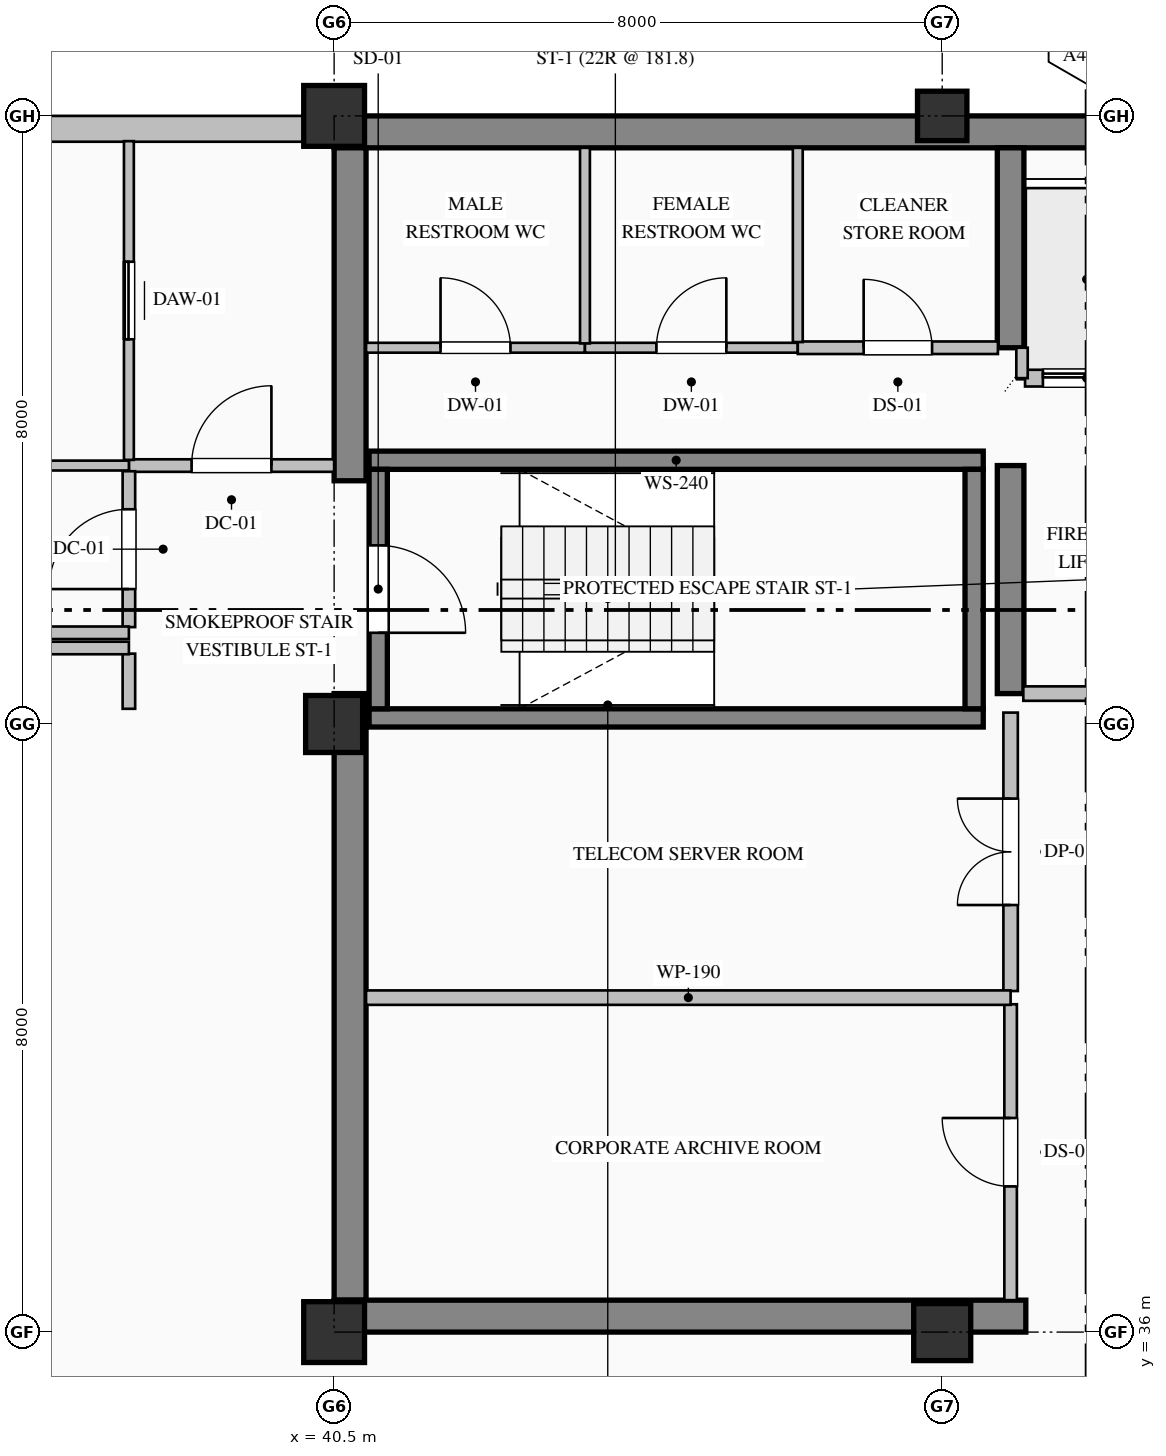
"""IFC4 building model, lengths in metres.
Left out: names, types, materials, properties, quantities, classifications, styles, units other than length and angle.
Written with IfcOpenShell. Run it as: python <this file> out.ifc"""

import sys

from ifc_helpers import new_model, si_unit, direction, frame, frame_2d, origin, origin_2d, place, context, subcontext, project, spatial, rectangle, hollow_rectangle, extrude, element, fill, save


model = new_model("IFC4")
c1 = context("Model", 3, precision=1e-05, world=origin(), true_north=direction((0.0, 1.0)))
c2 = subcontext(c1, "Body", "Model", "MODEL_VIEW")
j1 = project(units=[si_unit("LENGTHUNIT", "METRE"), si_unit("PLANEANGLEUNIT", "RADIAN")], contexts=[c1])
p1 = place(None, origin())
s1 = spatial("IfcSite", under=j1, at=p1, CompositionType="ELEMENT")
p2 = place(p1, origin())
s2 = spatial("IfcBuilding", under=s1, at=p2, CompositionType="ELEMENT")
p3 = place(p2, frame((0.0, 0.0, 335.2)))
s3 = spatial("IfcBuildingStorey", under=s2, at=p3, CompositionType="ELEMENT", Elevation=335.2)
p4 = place(p3, frame((40.5, 51.79, 0.0), z_axis=(0.0, 0.0, 1.0), x_axis=(1.0, 0.0, 0.0)))
e1 = element("IfcWall", 1, at=p4, inside=s3, PredefinedType="SHEAR", context=c2, shape_type="SweptSolid", body=[
    extrude(rectangle(XDim=23.5, YDim=0.42, at=frame_2d((11.75, 0.0))), origin(), (0.0, 0.0, 1.0), 3.785),
])
p5 = place(p3, frame((40.71, 36.42, 0.0), z_axis=(0.0, 0.0, 1.0), x_axis=(0.0, 1.0, 0.0)))
e2 = element("IfcWall", 2, at=p5, inside=s3, PredefinedType="SHEAR", context=c2, shape_type="SweptSolid", body=[
    extrude(rectangle(XDim=7.98, YDim=0.42, at=frame_2d((3.99, 0.0))), origin(), (0.0, 0.0, 1.0), 3.785),
])
p6 = place(p3, frame((40.71, 47.2, 0.0), z_axis=(0.0, 0.0, 1.0), x_axis=(0.0, 1.0, 0.0)))
e3 = element("IfcWall", 3, at=p6, inside=s3, PredefinedType="SHEAR", context=c2, shape_type="SweptSolid", body=[
    extrude(rectangle(XDim=4.38, YDim=0.42, at=frame_2d((2.19, 0.0))), origin(), (0.0, 0.0, 1.0), 3.785),
])
p7 = place(p3, frame((40.5, 36.21, 0.0), z_axis=(0.0, 0.0, 1.0), x_axis=(1.0, 0.0, 0.0)))
e4 = element("IfcWall", 4, at=p7, inside=s3, PredefinedType="SHEAR", context=c2, shape_type="SweptSolid", body=[
    extrude(rectangle(XDim=9.1, YDim=0.42, at=frame_2d((4.55, 0.0))), origin(), (0.0, 0.0, 1.0), 3.785),
])
p8 = place(p3, frame((49.4, 44.4, 0.0), z_axis=(0.0, 0.0, 1.0), x_axis=(0.0, 1.0, 0.0)))
e5 = element("IfcWall", 5, at=p8, inside=s3, PredefinedType="SHEAR", context=c2, shape_type="SweptSolid", body=[
    extrude(rectangle(XDim=3.0, YDim=0.35, at=frame_2d((1.5, 0.0))), origin(), (0.0, 0.0, 1.0), 3.785),
])
p9 = place(p3, frame((49.4, 48.95, 0.0), z_axis=(0.0, 0.0, 1.0), x_axis=(0.0, 1.0, 0.0)))
e6 = element("IfcWall", 6, at=p9, inside=s3, PredefinedType="SHEAR", context=c2, shape_type="SweptSolid", body=[
    extrude(rectangle(XDim=2.63, YDim=0.35, at=frame_2d((1.315, 0.0))), origin(), (0.0, 0.0, 1.0), 3.785),
])
p10 = place(p3, frame((40.5, 36.0, 0.0), z_axis=(0.0, 0.0, 1.0), x_axis=(1.0, 0.0, 0.0)))
e7 = element("IfcColumn", 7, at=p10, inside=s3, PredefinedType="COLUMN", context=c2, shape_type="SweptSolid", body=[
    extrude(hollow_rectangle(XDim=0.8, YDim=0.8, WallThickness=0.032, at=origin_2d()), origin(), (0.0, 0.0, 1.0), 4.0),
])
p11 = place(p3, frame((40.5, 44.0, 0.0), z_axis=(0.0, 0.0, 1.0), x_axis=(1.0, 0.0, 0.0)))
e8 = element("IfcColumn", 8, at=p11, inside=s3, PredefinedType="COLUMN", context=c2, shape_type="SweptSolid", body=[
    extrude(rectangle(XDim=0.75, YDim=0.75, at=origin_2d()), origin(), (0.0, 0.0, 1.0), 4.0),
])
p12 = place(p3, frame((40.5, 52.0, 0.0), z_axis=(0.0, 0.0, 1.0), x_axis=(1.0, 0.0, 0.0)))
e9 = element("IfcColumn", 9, at=p12, inside=s3, PredefinedType="COLUMN", context=c2, shape_type="SweptSolid", body=[
    extrude(hollow_rectangle(XDim=0.8, YDim=0.8, WallThickness=0.032, at=origin_2d()), origin(), (0.0, 0.0, 1.0), 4.0),
])
p13 = place(p3, frame((48.5, 36.0, 0.0), z_axis=(0.0, 0.0, 1.0), x_axis=(1.0, 0.0, 0.0)))
e10 = element("IfcColumn", 10, at=p13, inside=s3, PredefinedType="COLUMN", context=c2, shape_type="SweptSolid", body=[
    extrude(rectangle(XDim=0.75, YDim=0.75, at=origin_2d()), origin(), (0.0, 0.0, 1.0), 4.0),
])
p14 = place(p3, frame((48.5, 52.0, 0.0), z_axis=(0.0, 0.0, 1.0), x_axis=(1.0, 0.0, 0.0)))
e11 = element("IfcColumn", 11, at=p14, inside=s3, PredefinedType="COLUMN", context=c2, shape_type="SweptSolid", body=[
    extrude(hollow_rectangle(XDim=0.65, YDim=0.65, WallThickness=0.028, at=origin_2d()), origin(), (0.0, 0.0, 1.0), 4.0),
])
p15 = place(p3, frame((20.5, 51.83, 0.0), z_axis=(0.0, 0.0, 1.0), x_axis=(1.0, 0.0, 0.0)))
e12 = element("IfcWall", 12, at=p15, inside=s3, PredefinedType="SOLIDWALL", context=c2, shape_type="SweptSolid", body=[
    extrude(rectangle(XDim=20.02, YDim=0.34, at=frame_2d((10.01, 0.0))), origin(), (0.0, 0.0, 1.0), 3.335),
])
p16 = place(p15, frame((6.725, 0.0, 0.9)))
e13 = element("IfcOpeningElement", 13, at=p16, cuts=e12, PredefinedType="OPENING", context=c2, shape_type="SweptSolid", body=[
    extrude(rectangle(XDim=0.95, YDim=1.85, at=frame_2d((0.475, 0.925))), frame((0.0, 0.18, 0.0), z_axis=(0.0, -1.0, 0.0), x_axis=(1.0, 0.0, 0.0)), (0.0, 0.0, 1.0), 0.36),
])
p17 = place(p15, frame((10.275, 0.0, 0.8)))
e14 = element("IfcOpeningElement", 14, at=p17, cuts=e12, PredefinedType="OPENING", context=c2, shape_type="SweptSolid", body=[
    extrude(rectangle(XDim=1.05, YDim=2.15, at=frame_2d((0.525, 1.075))), frame((0.0, 0.18, 0.0), z_axis=(0.0, -1.0, 0.0), x_axis=(1.0, 0.0, 0.0)), (0.0, 0.0, 1.0), 0.36),
])
for number, where, z_axis, x_axis in (
    (15, (40.96, 47.47, 0.0), (0.0, 0.0, 1.0), (1.0, 0.0, 0.0)),
    (16, (49.04, 44.08, 0.0), (0.0, 0.0, 1.0), (-1.0, 0.0, 0.0)),
):
    element("IfcWall", number, at=place(p3, frame(where, z_axis=z_axis, x_axis=x_axis)), inside=s3, PredefinedType="SOLIDWALL", context=c2, shape_type="SweptSolid", body=[
        extrude(rectangle(XDim=8.08, YDim=0.24, at=frame_2d((4.04, 0.0))), origin(), (0.0, 0.0, 1.0), 4.0),
    ])
p18 = place(p3, frame((41.08, 47.35, 0.0), z_axis=(0.0, 0.0, 1.0), x_axis=(0.0, -1.0, 0.0)))
e17 = element("IfcWall", 17, at=p18, inside=s3, PredefinedType="SOLIDWALL", context=c2, shape_type="SweptSolid", body=[
    extrude(rectangle(XDim=3.15, YDim=0.24, at=frame_2d((1.575, 0.0))), origin(), (0.0, 0.0, 1.0), 4.0),
])
p19 = place(p18, frame((1.0, 0.0, 0.0)))
e18 = element("IfcOpeningElement", 18, at=p19, cuts=e17, PredefinedType="OPENING", context=c2, shape_type="SweptSolid", body=[
    extrude(rectangle(XDim=1.15, YDim=2.2, at=frame_2d((0.575, 1.1))), frame((0.0, 0.13, 0.0), z_axis=(0.0, -1.0, 0.0), x_axis=(1.0, 0.0, 0.0)), (0.0, 0.0, 1.0), 0.26),
])
p20 = place(p3, frame((48.92, 44.2, 0.0), z_axis=(0.0, 0.0, 1.0), x_axis=(0.0, 1.0, 0.0)))
e19 = element("IfcWall", 19, at=p20, inside=s3, PredefinedType="SOLIDWALL", context=c2, shape_type="SweptSolid", body=[
    extrude(rectangle(XDim=3.15, YDim=0.24, at=frame_2d((1.575, 0.0))), origin(), (0.0, 0.0, 1.0), 4.0),
])
p21 = place(p3, frame((54.71, 48.55, 0.0), z_axis=(0.0, 0.0, 1.0), x_axis=(-1.0, 0.0, 0.0)))
e20 = element("IfcWall", 20, at=p21, inside=s3, PredefinedType="PARTITIONING", context=c2, shape_type="SweptSolid", body=[
    extrude(rectangle(XDim=5.12, YDim=0.22, at=frame_2d((2.56, 0.0))), origin(), (0.0, 0.0, 1.0), 3.785),
])
p22 = place(p21, frame((3.735, 0.0, 0.0)))
e21 = element("IfcOpeningElement", 21, at=p22, cuts=e20, PredefinedType="OPENING", context=c2, shape_type="SweptSolid", body=[
    extrude(rectangle(XDim=1.15, YDim=2.2, at=frame_2d((0.575, 1.1))), frame((0.0, 0.12, 0.0), z_axis=(0.0, -1.0, 0.0), x_axis=(1.0, 0.0, 0.0)), (0.0, 0.0, 1.0), 0.24),
])
p23 = place(p21, frame((0.935, 0.0, 0.0)))
e22 = element("IfcOpeningElement", 22, at=p23, cuts=e20, PredefinedType="OPENING", context=c2, shape_type="SweptSolid", body=[
    extrude(rectangle(XDim=1.15, YDim=2.2, at=frame_2d((0.575, 1.1))), frame((0.0, 0.12, 0.0), z_axis=(0.0, -1.0, 0.0), x_axis=(1.0, 0.0, 0.0)), (0.0, 0.0, 1.0), 0.24),
])
p24 = place(p3, frame((49.55, 48.55, 0.0), z_axis=(0.0, 0.0, 1.0), x_axis=(0.0, 1.0, 0.0)))
e23 = element("IfcWall", 23, at=p24, inside=s3, PredefinedType="PARTITIONING", context=c2, shape_type="SweptSolid", body=[
    extrude(rectangle(XDim=0.4, YDim=0.15, at=frame_2d((0.2, 0.0))), origin(), (0.0, 0.0, 1.0), 3.785),
])
p25 = place(p3, frame((37.8, 47.4, 0.0), z_axis=(0.0, 0.0, 1.0), x_axis=(1.0, 0.0, 0.0)))
e24 = element("IfcWall", 24, at=p25, inside=s3, PredefinedType="PARTITIONING", context=c2, shape_type="SweptSolid", body=[
    extrude(rectangle(XDim=2.7, YDim=0.165, at=frame_2d((1.35, 0.0))), origin(), (0.0, 0.0, 1.0), 3.785),
])
p26 = place(p25, frame((0.825, 0.0, 0.0)))
e25 = element("IfcOpeningElement", 25, at=p26, cuts=e24, PredefinedType="OPENING", context=c2, shape_type="SweptSolid", body=[
    extrude(rectangle(XDim=1.05, YDim=2.15, at=frame_2d((0.525, 1.075))), frame((0.0, 0.093, 0.0), z_axis=(0.0, -1.0, 0.0), x_axis=(1.0, 0.0, 0.0)), (0.0, 0.0, 1.0), 0.185),
])
p27 = place(p3, frame((37.8, 45.274, 0.0), z_axis=(0.0, 0.0, 1.0), x_axis=(0.0, 1.0, 0.0)))
e26 = element("IfcWall", 26, at=p27, inside=s3, PredefinedType="PARTITIONING", context=c2, shape_type="SweptSolid", body=[
    extrude(rectangle(XDim=2.051, YDim=0.165, at=frame_2d((1.025, 0.0))), origin(), (0.0, 0.0, 1.0), 3.785),
])
p28 = place(p27, frame((0.5, 0.0, 0.0)))
e27 = element("IfcOpeningElement", 27, at=p28, cuts=e26, PredefinedType="OPENING", context=c2, shape_type="SweptSolid", body=[
    extrude(rectangle(XDim=1.05, YDim=2.15, at=frame_2d((0.525, 1.075))), frame((0.0, 0.093, 0.0), z_axis=(0.0, -1.0, 0.0), x_axis=(1.0, 0.0, 0.0)), (0.0, 0.0, 1.0), 0.185),
])
p29 = place(p3, frame((37.8, 44.2, 0.0), z_axis=(0.0, 0.0, 1.0), x_axis=(0.0, 1.0, 0.0)))
e28 = element("IfcWall", 28, at=p29, inside=s3, PredefinedType="PARTITIONING", context=c2, shape_type="SweptSolid", body=[
    extrude(rectangle(XDim=0.726, YDim=0.165, at=frame_2d((0.363, 0.0))), origin(), (0.0, 0.0, 1.0), 3.785),
])
p30 = place(p3, frame((37.8, 47.475, 0.0), z_axis=(0.0, 0.0, 1.0), x_axis=(0.0, 1.0, 0.0)))
e29 = element("IfcWall", 29, at=p30, inside=s3, PredefinedType="PARTITIONING", context=c2, shape_type="SweptSolid", body=[
    extrude(rectangle(XDim=4.193, YDim=0.13, at=frame_2d((2.097, 0.0))), origin(), (0.0, 0.0, 1.0), 3.785),
])
p31 = place(p30, frame((1.587, 0.0, 0.0)))
e30 = element("IfcOpeningElement", 30, at=p31, cuts=e29, PredefinedType="OPENING", context=c2, shape_type="SweptSolid", body=[
    extrude(rectangle(XDim=1.02, YDim=2.15, at=frame_2d((0.51, 1.075))), frame((0.0, 0.075, 0.0), z_axis=(0.0, -1.0, 0.0), x_axis=(1.0, 0.0, 0.0)), (0.0, 0.0, 1.0), 0.15),
])
p32 = place(p3, frame((37.8, 47.4, 0.0), z_axis=(0.0, 0.0, 1.0), x_axis=(-1.0, 0.0, 0.0)))
e31 = element("IfcWall", 31, at=p32, inside=s3, PredefinedType="PARTITIONING", context=c2, shape_type="SweptSolid", body=[
    extrude(rectangle(XDim=2.4, YDim=0.13, at=frame_2d((1.2, 0.0))), origin(), (0.0, 0.0, 1.0), 3.785),
])
p33 = place(p3, frame((40.92, 48.95, 0.0), z_axis=(0.0, 0.0, 1.0), x_axis=(1.0, 0.0, 0.0)))
e32 = element("IfcWall", 32, at=p33, inside=s3, PredefinedType="PARTITIONING", context=c2, shape_type="SweptSolid", body=[
    extrude(rectangle(XDim=2.88, YDim=0.13, at=frame_2d((1.44, 0.0))), origin(), (0.0, 0.0, 1.0), 3.785),
])
p34 = place(p33, frame((0.98, 0.0, 0.0)))
e33 = element("IfcOpeningElement", 33, at=p34, cuts=e32, PredefinedType="OPENING", context=c2, shape_type="SweptSolid", body=[
    extrude(rectangle(XDim=0.92, YDim=2.15, at=frame_2d((0.46, 1.075))), frame((0.0, 0.075, 0.0), z_axis=(0.0, -1.0, 0.0), x_axis=(1.0, 0.0, 0.0)), (0.0, 0.0, 1.0), 0.15),
])
p35 = place(p3, frame((43.8, 48.95, 0.0), z_axis=(0.0, 0.0, 1.0), x_axis=(1.0, 0.0, 0.0)))
e34 = element("IfcWall", 34, at=p35, inside=s3, PredefinedType="PARTITIONING", context=c2, shape_type="SweptSolid", body=[
    extrude(rectangle(XDim=2.8, YDim=0.13, at=frame_2d((1.4, 0.0))), origin(), (0.0, 0.0, 1.0), 3.785),
])
p36 = place(p35, frame((0.94, 0.0, 0.0)))
e35 = element("IfcOpeningElement", 35, at=p36, cuts=e34, PredefinedType="OPENING", context=c2, shape_type="SweptSolid", body=[
    extrude(rectangle(XDim=0.92, YDim=2.15, at=frame_2d((0.46, 1.075))), frame((0.0, 0.075, 0.0), z_axis=(0.0, -1.0, 0.0), x_axis=(1.0, 0.0, 0.0)), (0.0, 0.0, 1.0), 0.15),
])
p37 = place(p3, frame((46.6, 48.95, 0.0), z_axis=(0.0, 0.0, 1.0), x_axis=(1.0, 0.0, 0.0)))
e36 = element("IfcWall", 36, at=p37, inside=s3, PredefinedType="PARTITIONING", context=c2, shape_type="SweptSolid", body=[
    extrude(rectangle(XDim=2.633, YDim=0.165, at=frame_2d((1.316, 0.0))), origin(), (0.0, 0.0, 1.0), 3.785),
])
p38 = place(p37, frame((0.866, 0.0, 0.0)))
e37 = element("IfcOpeningElement", 37, at=p38, cuts=e36, PredefinedType="OPENING", context=c2, shape_type="SweptSolid", body=[
    extrude(rectangle(XDim=0.9, YDim=2.15, at=frame_2d((0.45, 1.075))), frame((0.0, 0.093, 0.0), z_axis=(0.0, -1.0, 0.0), x_axis=(1.0, 0.0, 0.0)), (0.0, 0.0, 1.0), 0.185),
])
p39 = place(p3, frame((54.733, 44.4, 0.0), z_axis=(0.0, 0.0, 1.0), x_axis=(-1.0, 0.0, 0.0)))
e38 = element("IfcWall", 38, at=p39, inside=s3, PredefinedType="PARTITIONING", context=c2, shape_type="SweptSolid", body=[
    extrude(rectangle(XDim=5.166, YDim=0.19, at=frame_2d((2.583, 0.0))), origin(), (0.0, 0.0, 1.0), 3.785),
])
p40 = place(p39, frame((2.058, 0.0, 0.0)))
e39 = element("IfcOpeningElement", 39, at=p40, cuts=e38, PredefinedType="OPENING", context=c2, shape_type="SweptSolid", body=[
    extrude(rectangle(XDim=1.05, YDim=2.15, at=frame_2d((0.525, 1.075))), frame((0.0, 0.105, 0.0), z_axis=(0.0, -1.0, 0.0), x_axis=(1.0, 0.0, 0.0)), (0.0, 0.0, 1.0), 0.21),
])
p41 = place(p3, frame((49.4, 36.42, 0.0), z_axis=(0.0, 0.0, 1.0), x_axis=(0.0, 1.0, 0.0)))
e40 = element("IfcWall", 40, at=p41, inside=s3, PredefinedType="PARTITIONING", context=c2, shape_type="SweptSolid", body=[
    extrude(rectangle(XDim=3.893, YDim=0.165, at=frame_2d((1.947, 0.0))), origin(), (0.0, 0.0, 1.0), 3.027),
])
p42 = place(p41, frame((1.497, 0.0, 0.0)))
e41 = element("IfcOpeningElement", 41, at=p42, cuts=e40, PredefinedType="OPENING", context=c2, shape_type="SweptSolid", body=[
    extrude(rectangle(XDim=0.9, YDim=2.15, at=frame_2d((0.45, 1.075))), frame((0.0, 0.093, 0.0), z_axis=(0.0, -1.0, 0.0), x_axis=(1.0, 0.0, 0.0)), (0.0, 0.0, 1.0), 0.185),
])
p43 = place(p3, frame((49.4, 40.487, 0.0), z_axis=(0.0, 0.0, 1.0), x_axis=(0.0, 1.0, 0.0)))
e42 = element("IfcWall", 42, at=p43, inside=s3, PredefinedType="PARTITIONING", context=c2, shape_type="SweptSolid", body=[
    extrude(rectangle(XDim=3.663, YDim=0.19, at=frame_2d((1.832, 0.0))), origin(), (0.0, 0.0, 1.0), 3.027),
])
p44 = place(p43, frame((1.132, 0.0, 0.0)))
e43 = element("IfcOpeningElement", 43, at=p44, cuts=e42, PredefinedType="OPENING", context=c2, shape_type="SweptSolid", body=[
    extrude(rectangle(XDim=1.4, YDim=2.25, at=frame_2d((0.7, 1.125))), frame((0.0, 0.105, 0.0), z_axis=(0.0, -1.0, 0.0), x_axis=(1.0, 0.0, 0.0)), (0.0, 0.0, 1.0), 0.21),
])
p45 = place(p3, frame((40.92, 40.4, 0.0), z_axis=(0.0, 0.0, 1.0), x_axis=(1.0, 0.0, 0.0)))
e44 = element("IfcWall", 44, at=p45, inside=s3, PredefinedType="PARTITIONING", context=c2, shape_type="SweptSolid", body=[
    extrude(rectangle(XDim=8.48, YDim=0.19, at=frame_2d((4.24, 0.0))), origin(), (0.0, 0.0, 1.0), 3.785),
])
p46 = place(p3, frame((43.8, 51.58, 0.0), z_axis=(0.0, 0.0, 1.0), x_axis=(0.0, -1.0, 0.0)))
e45 = element("IfcWall", 45, at=p46, inside=s3, PredefinedType="PARTITIONING", context=c2, shape_type="SweptSolid", body=[
    extrude(rectangle(XDim=2.573, YDim=0.13, at=frame_2d((1.287, 0.0))), origin(), (0.0, 0.0, 1.0), 3.785),
])
p47 = place(p3, frame((46.6, 51.58, 0.0), z_axis=(0.0, 0.0, 1.0), x_axis=(0.0, -1.0, 0.0)))
e46 = element("IfcWall", 46, at=p47, inside=s3, PredefinedType="PARTITIONING", context=c2, shape_type="SweptSolid", body=[
    extrude(rectangle(XDim=2.556, YDim=0.13, at=frame_2d((1.278, 0.0))), origin(), (0.0, 0.0, 1.0), 3.785),
])
p48 = place(p3, frame((37.8, 45.2, 0.0), z_axis=(0.0, 0.0, 1.0), x_axis=(-1.0, 0.0, 0.0)))
e47 = element("IfcWall", 47, at=p48, inside=s3, PredefinedType="PARTITIONING", context=c2, shape_type="SweptSolid", body=[
    extrude(rectangle(XDim=13.3, YDim=0.165, at=frame_2d((6.65, 0.0))), origin(), (0.0, 0.0, 1.0), 3.785),
])
p49 = place(p48, frame((6.15, 0.0, 0.0)))
e48 = element("IfcOpeningElement", 48, at=p49, cuts=e47, PredefinedType="OPENING", context=c2, shape_type="SweptSolid", body=[
    extrude(rectangle(XDim=1.0, YDim=2.15, at=frame_2d((0.5, 1.075))), frame((0.0, 0.093, 0.0), z_axis=(0.0, -1.0, 0.0), x_axis=(1.0, 0.0, 0.0)), (0.0, 0.0, 1.0), 0.185),
])
p50 = place(p3, frame((35.4, 45.0, 0.0), z_axis=(0.0, 0.0, 1.0), x_axis=(1.0, 0.0, 0.0)))
e49 = element("IfcWall", 49, at=p50, inside=s3, PredefinedType="PARTITIONING", context=c2, shape_type="SweptSolid", body=[
    extrude(rectangle(XDim=2.4, YDim=0.165, at=frame_2d((1.2, 0.0))), origin(), (0.0, 0.0, 1.0), 3.785),
])
p51 = place(p19, origin())
e50 = element("IfcDoor", 50, at=p51, inside=s3, OperationType="SINGLE_SWING_RIGHT", PredefinedType="DOOR", context=c2, shape_type="SweptSolid", body=[
    extrude(rectangle(XDim=1.15, YDim=2.2, at=frame_2d((0.575, 1.1))), frame((0.0, 0.025, 0.0), z_axis=(0.0, -1.0, 0.0), x_axis=(1.0, 0.0, 0.0)), (0.0, 0.0, 1.0), 0.05),
])
fill(e18, e50)
p52 = place(p22, origin())
e51 = element("IfcDoor", 51, at=p52, inside=s3, OperationType="DOUBLE_DOOR_SLIDING", PredefinedType="DOOR", context=c2, shape_type="SweptSolid", body=[
    extrude(rectangle(XDim=1.15, YDim=2.2, at=frame_2d((0.575, 1.1))), frame((0.0, 0.025, 0.0), z_axis=(0.0, -1.0, 0.0), x_axis=(1.0, 0.0, 0.0)), (0.0, 0.0, 1.0), 0.05),
])
fill(e21, e51)
p53 = place(p26, origin())
e52 = element("IfcDoor", 52, at=p53, inside=s3, OperationType="SINGLE_SWING_RIGHT", PredefinedType="DOOR", context=c2, shape_type="SweptSolid", body=[
    extrude(rectangle(XDim=1.05, YDim=2.15, at=frame_2d((0.525, 1.075))), frame((0.0, 0.025, 0.0), z_axis=(0.0, -1.0, 0.0), x_axis=(1.0, 0.0, 0.0)), (0.0, 0.0, 1.0), 0.05),
])
fill(e25, e52)
p54 = place(p28, origin())
e53 = element("IfcDoor", 53, at=p54, inside=s3, OperationType="SINGLE_SWING_LEFT", PredefinedType="DOOR", context=c2, shape_type="SweptSolid", body=[
    extrude(rectangle(XDim=1.05, YDim=2.15, at=frame_2d((0.525, 1.075))), frame((0.0, 0.025, 0.0), z_axis=(0.0, -1.0, 0.0), x_axis=(1.0, 0.0, 0.0)), (0.0, 0.0, 1.0), 0.05),
])
fill(e27, e53)
p55 = place(p31, origin())
e54 = element("IfcDoor", 54, at=p55, inside=s3, OperationType="SLIDING_TO_LEFT", PredefinedType="DOOR", context=c2, shape_type="SweptSolid", body=[
    extrude(rectangle(XDim=1.02, YDim=2.15, at=frame_2d((0.51, 1.075))), frame((0.0, 0.025, 0.0), z_axis=(0.0, -1.0, 0.0), x_axis=(1.0, 0.0, 0.0)), (0.0, 0.0, 1.0), 0.05),
])
fill(e30, e54)
p56 = place(p42, origin())
e55 = element("IfcDoor", 55, at=p56, inside=s3, OperationType="SINGLE_SWING_RIGHT", PredefinedType="DOOR", context=c2, shape_type="SweptSolid", body=[
    extrude(rectangle(XDim=0.9, YDim=2.15, at=frame_2d((0.45, 1.075))), frame((0.0, 0.025, 0.0), z_axis=(0.0, -1.0, 0.0), x_axis=(1.0, 0.0, 0.0)), (0.0, 0.0, 1.0), 0.05),
])
fill(e41, e55)
p57 = place(p44, origin())
e56 = element("IfcDoor", 56, at=p57, inside=s3, OperationType="DOUBLE_DOOR_SINGLE_SWING", PredefinedType="DOOR", context=c2, shape_type="SweptSolid", body=[
    extrude(rectangle(XDim=1.4, YDim=2.25, at=frame_2d((0.7, 1.125))), frame((0.0, 0.025, 0.0), z_axis=(0.0, -1.0, 0.0), x_axis=(1.0, 0.0, 0.0)), (0.0, 0.0, 1.0), 0.05),
])
fill(e43, e56)
p58 = place(p34, origin())
e57 = element("IfcDoor", 57, at=p58, inside=s3, OperationType="SINGLE_SWING_LEFT", PredefinedType="DOOR", context=c2, shape_type="SweptSolid", body=[
    extrude(rectangle(XDim=0.92, YDim=2.15, at=frame_2d((0.46, 1.075))), frame((0.0, 0.025, 0.0), z_axis=(0.0, -1.0, 0.0), x_axis=(1.0, 0.0, 0.0)), (0.0, 0.0, 1.0), 0.05),
])
fill(e33, e57)
p59 = place(p36, origin())
e58 = element("IfcDoor", 58, at=p59, inside=s3, OperationType="SINGLE_SWING_RIGHT", PredefinedType="DOOR", context=c2, shape_type="SweptSolid", body=[
    extrude(rectangle(XDim=0.92, YDim=2.15, at=frame_2d((0.46, 1.075))), frame((0.0, 0.025, 0.0), z_axis=(0.0, -1.0, 0.0), x_axis=(1.0, 0.0, 0.0)), (0.0, 0.0, 1.0), 0.05),
])
fill(e35, e58)
p60 = place(p38, origin())
e59 = element("IfcDoor", 59, at=p60, inside=s3, OperationType="SINGLE_SWING_LEFT", PredefinedType="DOOR", context=c2, shape_type="SweptSolid", body=[
    extrude(rectangle(XDim=0.9, YDim=2.15, at=frame_2d((0.45, 1.075))), frame((0.0, 0.025, 0.0), z_axis=(0.0, -1.0, 0.0), x_axis=(1.0, 0.0, 0.0)), (0.0, 0.0, 1.0), 0.05),
])
fill(e37, e59)
save(model, sys.argv[1])
